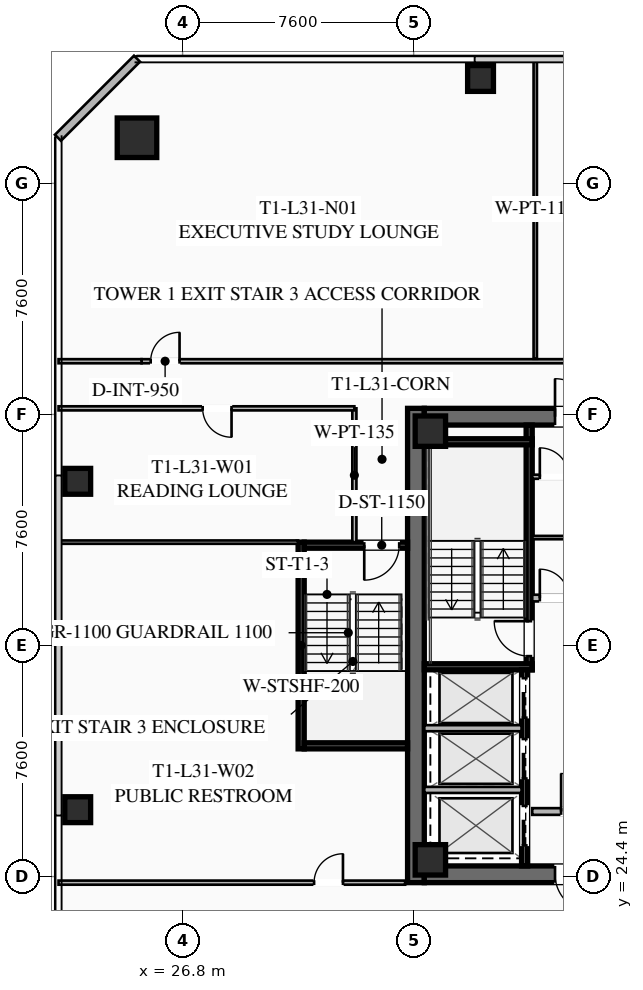
"""IFC4 building model, lengths in metres.
Left out: names, types, materials, properties, quantities, classifications, styles, units other than length and angle.
Written with IfcOpenShell. Run it as: python <this file> out.ifc"""

import sys

from ifc_helpers import new_model, si_unit, direction, frame, frame_2d, origin, origin_2d, place, context, subcontext, project, spatial, rectangle, hollow_rectangle, extrude, element, fill, save


model = new_model("IFC4")
c1 = context("Model", 3, precision=1e-05, world=origin(), true_north=direction((0.0, 1.0)))
c2 = subcontext(c1, "Body", "Model", "MODEL_VIEW")
j1 = project(units=[si_unit("LENGTHUNIT", "METRE"), si_unit("PLANEANGLEUNIT", "RADIAN")], contexts=[c1])
p1 = place(None, origin())
s1 = spatial("IfcSite", under=j1, at=p1, CompositionType="ELEMENT")
p2 = place(p1, origin())
s2 = spatial("IfcBuilding", under=s1, at=p2, CompositionType="ELEMENT")
p3 = place(p2, frame((0.0, 0.0, 117.95)))
s3 = spatial("IfcBuildingStorey", under=s2, at=p3, CompositionType="ELEMENT", Elevation=117.95)
p4 = place(p3, frame((34.475, 24.2, 0.0), z_axis=(0.0, 0.0, 1.0), x_axis=(0.0, 1.0, 0.0)))
e1 = element("IfcWall", 1, at=p4, inside=s3, PredefinedType="SHEAR", context=c2, shape_type="SweptSolid", body=[
    extrude(rectangle(XDim=15.6, YDim=0.55, at=frame_2d((7.8, 0.0))), origin(), (0.0, 0.0, 1.0), 3.55),
])
p5 = place(p3, frame((49.25, 24.475, 0.0), z_axis=(0.0, 0.0, 1.0), x_axis=(-1.0, 0.0, 0.0)))
e2 = element("IfcWall", 2, at=p5, inside=s3, PredefinedType="SHEAR", context=c2, shape_type="SweptSolid", body=[
    extrude(rectangle(XDim=14.5, YDim=0.55, at=frame_2d((7.25, 0.0))), origin(), (0.0, 0.0, 1.0), 3.55),
])
p6 = place(p5, frame((8.95, 0.0, 0.0)))
e3 = element("IfcOpeningElement", 3, at=p6, cuts=e2, PredefinedType="OPENING", context=c2, shape_type="SweptSolid", body=[
    extrude(rectangle(XDim=1.25, YDim=2.25, at=frame_2d((0.625, 1.125))), frame((0.0, 0.285, 0.0), z_axis=(0.0, -1.0, 0.0), x_axis=(1.0, 0.0, 0.0)), (0.0, 0.0, 1.0), 0.57),
])
p7 = place(p5, frame((3.9, 0.0, 0.0)))
e4 = element("IfcOpeningElement", 4, at=p7, cuts=e2, PredefinedType="OPENING", context=c2, shape_type="SweptSolid", body=[
    extrude(rectangle(XDim=1.25, YDim=2.25, at=frame_2d((0.625, 1.125))), frame((0.0, 0.285, 0.0), z_axis=(0.0, -1.0, 0.0), x_axis=(1.0, 0.0, 0.0)), (0.0, 0.0, 1.0), 0.57),
])
p8 = place(p3, frame((34.75, 39.525, 0.0), z_axis=(0.0, 0.0, 1.0), x_axis=(1.0, 0.0, 0.0)))
e5 = element("IfcWall", 5, at=p8, inside=s3, PredefinedType="SHEAR", context=c2, shape_type="SweptSolid", body=[
    extrude(rectangle(XDim=14.5, YDim=0.55, at=frame_2d((7.25, 0.0))), origin(), (0.0, 0.0, 1.0), 3.55),
])
p9 = place(p8, frame((4.3, 0.0, 0.0)))
e6 = element("IfcOpeningElement", 6, at=p9, cuts=e5, PredefinedType="OPENING", context=c2, shape_type="SweptSolid", body=[
    extrude(rectangle(XDim=1.25, YDim=2.25, at=frame_2d((0.625, 1.125))), frame((0.0, 0.285, 0.0), z_axis=(0.0, -1.0, 0.0), x_axis=(1.0, 0.0, 0.0)), (0.0, 0.0, 1.0), 0.57),
])
p10 = place(p8, frame((9.35, 0.0, 0.0)))
e7 = element("IfcOpeningElement", 7, at=p10, cuts=e5, PredefinedType="OPENING", context=c2, shape_type="SweptSolid", body=[
    extrude(rectangle(XDim=1.25, YDim=2.25, at=frame_2d((0.625, 1.125))), frame((0.0, 0.285, 0.0), z_axis=(0.0, -1.0, 0.0), x_axis=(1.0, 0.0, 0.0)), (0.0, 0.0, 1.0), 0.57),
])
for number, where, z_axis, x_axis in (
    (8, (34.95, 24.95, 0.0), (0.0, 0.0, 1.0), (1.0, 0.0, 0.0)),
    (9, (34.95, 39.05, 0.0), (0.0, 0.0, 1.0), (1.0, 0.0, 0.0)),
):
    element("IfcColumn", number, at=place(p3, frame(where, z_axis=z_axis, x_axis=x_axis)), inside=s3, PredefinedType="COLUMN", context=c2, shape_type="SweptSolid", body=[
        extrude(hollow_rectangle(XDim=1.0, YDim=1.0, WallThickness=0.04, at=origin_2d()), origin(), (0.0, 0.0, 1.0), 3.37),
    ])
p11 = place(p3, frame((25.3, 48.7, 0.0), z_axis=(0.0, 0.0, 1.0), x_axis=(1.0, 0.0, 0.0)))
e10 = element("IfcColumn", 10, at=p11, inside=s3, PredefinedType="COLUMN", context=c2, shape_type="SweptSolid", body=[
    extrude(hollow_rectangle(XDim=1.3, YDim=1.3, WallThickness=0.05, at=origin_2d()), origin(), (0.0, 0.0, 1.0), 3.37),
])
for number, where, z_axis, x_axis in (
    (11, (36.6, 50.65, 0.0), (0.0, 0.0, 1.0), (1.0, 0.0, 0.0)),
    (12, (23.35, 37.4, 0.0), (0.0, 0.0, 1.0), (1.0, 0.0, 0.0)),
    (13, (23.35, 26.6, 0.0), (0.0, 0.0, 1.0), (1.0, 0.0, 0.0)),
):
    element("IfcColumn", number, at=place(p3, frame(where, z_axis=z_axis, x_axis=x_axis)), inside=s3, PredefinedType="COLUMN", context=c2, shape_type="SweptSolid", body=[
        extrude(hollow_rectangle(XDim=0.85, YDim=0.85, WallThickness=0.035, at=origin_2d()), origin(), (0.0, 0.0, 1.0), 3.37),
    ])
p12 = place(p3, frame((22.7, 48.7, 0.0), z_axis=(0.0, 0.0, 1.0), x_axis=(0.707106781187, 0.707106781187, 0.0)))
e14 = element("IfcWall", 14, at=p12, inside=s3, PredefinedType="SOLIDWALL", context=c2, shape_type="SweptSolid", body=[
    extrude(rectangle(XDim=3.677, YDim=0.28, at=frame_2d((1.838, 0.0))), origin(), (0.0, 0.0, 1.0), 3.37),
])
p13 = place(p3, frame((38.2, 31.2, 0.0), z_axis=(0.0, 0.0, 1.0), x_axis=(0.0, 1.0, 0.0)))
e15 = element("IfcWall", 15, at=p13, inside=s3, PredefinedType="SHEAR", context=c2, shape_type="SweptSolid", body=[
    extrude(rectangle(XDim=8.05, YDim=0.2, at=frame_2d((4.025, 0.0))), origin(), (0.0, 0.0, 1.0), 3.37),
])
p14 = place(p13, frame((0.45, 0.0, 0.0)))
e16 = element("IfcOpeningElement", 16, at=p14, cuts=e15, PredefinedType="OPENING", context=c2, shape_type="SweptSolid", body=[
    extrude(rectangle(XDim=1.15, YDim=2.2, at=frame_2d((0.575, 1.1))), frame((0.0, 0.11, 0.0), z_axis=(0.0, -1.0, 0.0), x_axis=(1.0, 0.0, 0.0)), (0.0, 0.0, 1.0), 0.22),
])
for number, where, z_axis, x_axis in (
    (17, (34.75, 31.3, 0.0), (0.0, 0.0, 1.0), (1.0, 0.0, 0.0)),
    (18, (34.75, 38.7, 0.0), (0.0, 0.0, 1.0), (1.0, 0.0, 0.0)),
):
    element("IfcWall", number, at=place(p3, frame(where, z_axis=z_axis, x_axis=x_axis)), inside=s3, PredefinedType="SHEAR", context=c2, shape_type="SweptSolid", body=[
        extrude(rectangle(XDim=3.55, YDim=0.2, at=frame_2d((1.775, 0.0))), origin(), (0.0, 0.0, 1.0), 3.37),
    ])
p15 = place(p3, frame((38.3, 33.56, 0.0), z_axis=(0.0, 0.0, 1.0), x_axis=(1.0, 0.0, 0.0)))
e19 = element("IfcWall", 19, at=p15, inside=s3, PredefinedType="SOLIDWALL", context=c2, shape_type="SweptSolid", body=[
    extrude(rectangle(XDim=3.15, YDim=0.22, at=frame_2d((1.575, 0.0))), origin(), (0.0, 0.0, 1.0), 2.723),
])
p16 = place(p15, frame((0.25, 0.0, 0.0)))
e20 = element("IfcOpeningElement", 20, at=p16, cuts=e19, PredefinedType="OPENING", context=c2, shape_type="SweptSolid", body=[
    extrude(rectangle(XDim=0.95, YDim=2.05, at=frame_2d((0.475, 1.025))), frame((0.0, 0.12, 0.0), z_axis=(0.0, -1.0, 0.0), x_axis=(1.0, 0.0, 0.0)), (0.0, 0.0, 1.0), 0.24),
])
p17 = place(p15, frame((1.95, 0.0, 0.0)))
e21 = element("IfcOpeningElement", 21, at=p17, cuts=e19, PredefinedType="OPENING", context=c2, shape_type="SweptSolid", body=[
    extrude(rectangle(XDim=0.95, YDim=2.05, at=frame_2d((0.475, 1.025))), frame((0.0, 0.12, 0.0), z_axis=(0.0, -1.0, 0.0), x_axis=(1.0, 0.0, 0.0)), (0.0, 0.0, 1.0), 0.24),
])
p18 = place(p3, frame((38.3, 26.54, 0.0), z_axis=(0.0, 0.0, 1.0), x_axis=(1.0, 0.0, 0.0)))
e22 = element("IfcWall", 22, at=p18, inside=s3, PredefinedType="SOLIDWALL", context=c2, shape_type="SweptSolid", body=[
    extrude(rectangle(XDim=3.15, YDim=0.22, at=frame_2d((1.575, 0.0))), origin(), (0.0, 0.0, 1.0), 2.723),
])
p19 = place(p18, frame((0.95, 0.0, 0.0)))
e23 = element("IfcOpeningElement", 23, at=p19, cuts=e22, PredefinedType="OPENING", context=c2, shape_type="SweptSolid", body=[
    extrude(rectangle(XDim=1.25, YDim=2.25, at=frame_2d((0.625, 1.125))), frame((0.0, 0.12, 0.0), z_axis=(0.0, -1.0, 0.0), x_axis=(1.0, 0.0, 0.0)), (0.0, 0.0, 1.0), 0.24),
])
p20 = place(p3, frame((38.05, 24.75, 0.0), z_axis=(0.0, 0.0, 1.0), x_axis=(0.0, 1.0, 0.0)))
e24 = element("IfcWall", 24, at=p20, inside=s3, PredefinedType="SHEAR", context=c2, shape_type="SweptSolid", body=[
    extrude(rectangle(XDim=6.45, YDim=0.2, at=frame_2d((3.225, 0.0))), origin(), (0.0, 0.0, 1.0), 3.37),
])
p21 = place(p20, frame((4.875, 0.0, 0.0)))
e25 = element("IfcOpeningElement", 25, at=p21, cuts=e24, PredefinedType="OPENING", context=c2, shape_type="SweptSolid", body=[
    extrude(rectangle(XDim=1.3, YDim=2.25, at=frame_2d((0.65, 1.125))), frame((0.0, 0.11, 0.0), z_axis=(0.0, -1.0, 0.0), x_axis=(1.0, 0.0, 0.0)), (0.0, 0.0, 1.0), 0.22),
])
p22 = place(p20, frame((2.875, 0.0, 0.0)))
e26 = element("IfcOpeningElement", 26, at=p22, cuts=e24, PredefinedType="OPENING", context=c2, shape_type="SweptSolid", body=[
    extrude(rectangle(XDim=1.3, YDim=2.25, at=frame_2d((0.65, 1.125))), frame((0.0, 0.11, 0.0), z_axis=(0.0, -1.0, 0.0), x_axis=(1.0, 0.0, 0.0)), (0.0, 0.0, 1.0), 0.22),
])
p23 = place(p20, frame((0.675, 0.0, 0.0)))
e27 = element("IfcOpeningElement", 27, at=p23, cuts=e24, PredefinedType="OPENING", context=c2, shape_type="SweptSolid", body=[
    extrude(rectangle(XDim=1.3, YDim=2.25, at=frame_2d((0.65, 1.125))), frame((0.0, 0.11, 0.0), z_axis=(0.0, -1.0, 0.0), x_axis=(1.0, 0.0, 0.0)), (0.0, 0.0, 1.0), 0.22),
])
for number, where, z_axis, x_axis in (
    (28, (34.75, 27.25, 0.0), (0.0, 0.0, 1.0), (1.0, 0.0, 0.0)),
    (29, (34.75, 29.28, 0.0), (0.0, 0.0, 1.0), (1.0, 0.0, 0.0)),
):
    element("IfcWall", number, at=place(p3, frame(where, z_axis=z_axis, x_axis=x_axis)), inside=s3, PredefinedType="SOLIDWALL", context=c2, shape_type="SweptSolid", body=[
        extrude(rectangle(XDim=3.2, YDim=0.2, at=frame_2d((1.6, 0.0))), origin(), (0.0, 0.0, 1.0), 3.37),
    ])
p24 = place(p3, frame((38.3, 37.55, 0.0), z_axis=(0.0, 0.0, 1.0), x_axis=(1.0, 0.0, 0.0)))
e30 = element("IfcWall", 30, at=p24, inside=s3, PredefinedType="PARTITIONING", context=c2, shape_type="SweptSolid", body=[
    extrude(rectangle(XDim=3.15, YDim=0.135, at=frame_2d((1.575, 0.0))), origin(), (0.0, 0.0, 1.0), 2.723),
])
p25 = place(p24, frame((0.25, 0.0, 0.0)))
e31 = element("IfcOpeningElement", 31, at=p25, cuts=e30, PredefinedType="OPENING", context=c2, shape_type="SweptSolid", body=[
    extrude(rectangle(XDim=0.95, YDim=2.05, at=frame_2d((0.475, 1.025))), frame((0.0, 0.077, 0.0), z_axis=(0.0, -1.0, 0.0), x_axis=(1.0, 0.0, 0.0)), (0.0, 0.0, 1.0), 0.155),
])
p26 = place(p24, frame((1.95, 0.0, 0.0)))
e32 = element("IfcOpeningElement", 32, at=p26, cuts=e30, PredefinedType="OPENING", context=c2, shape_type="SweptSolid", body=[
    extrude(rectangle(XDim=0.95, YDim=2.05, at=frame_2d((0.475, 1.025))), frame((0.0, 0.077, 0.0), z_axis=(0.0, -1.0, 0.0), x_axis=(1.0, 0.0, 0.0)), (0.0, 0.0, 1.0), 0.155),
])
p27 = place(p3, frame((38.3, 35.55, 0.0), z_axis=(0.0, 0.0, 1.0), x_axis=(1.0, 0.0, 0.0)))
e33 = element("IfcWall", 33, at=p27, inside=s3, PredefinedType="PARTITIONING", context=c2, shape_type="SweptSolid", body=[
    extrude(rectangle(XDim=3.15, YDim=0.11, at=frame_2d((1.575, 0.0))), origin(), (0.0, 0.0, 1.0), 2.723),
])
p28 = place(p3, frame((30.7, 28.6, 0.0), z_axis=(0.0, 0.0, 1.0), x_axis=(0.0, 1.0, 0.0)))
e34 = element("IfcWall", 34, at=p28, inside=s3, PredefinedType="SHEAR", context=c2, shape_type="SweptSolid", body=[
    extrude(rectangle(XDim=6.8, YDim=0.2, at=frame_2d((3.4, 0.0))), origin(), (0.0, 0.0, 1.0), 3.37),
])
p29 = place(p3, frame((34.2, 35.3, 0.0), z_axis=(0.0, 0.0, 1.0), x_axis=(-1.0, 0.0, 0.0)))
e35 = element("IfcWall", 35, at=p29, inside=s3, PredefinedType="SHEAR", context=c2, shape_type="SweptSolid", body=[
    extrude(rectangle(XDim=3.4, YDim=0.2, at=frame_2d((1.7, 0.0))), origin(), (0.0, 0.0, 1.0), 3.37),
])
p30 = place(p29, frame((0.275, 0.0, 0.0)))
e36 = element("IfcOpeningElement", 36, at=p30, cuts=e35, PredefinedType="OPENING", context=c2, shape_type="SweptSolid", body=[
    extrude(rectangle(XDim=1.15, YDim=2.2, at=frame_2d((0.575, 1.1))), frame((0.0, 0.11, 0.0), z_axis=(0.0, -1.0, 0.0), x_axis=(1.0, 0.0, 0.0)), (0.0, 0.0, 1.0), 0.22),
])
p31 = place(p3, frame((30.8, 28.7, 0.0), z_axis=(0.0, 0.0, 1.0), x_axis=(1.0, 0.0, 0.0)))
e37 = element("IfcWall", 37, at=p31, inside=s3, PredefinedType="SHEAR", context=c2, shape_type="SweptSolid", body=[
    extrude(rectangle(XDim=3.4, YDim=0.2, at=frame_2d((1.7, 0.0))), origin(), (0.0, 0.0, 1.0), 3.37),
])
p32 = place(p3, frame((32.45, 35.4, 0.0), z_axis=(0.0, 0.0, 1.0), x_axis=(0.0, 1.0, 0.0)))
e38 = element("IfcWall", 38, at=p32, inside=s3, PredefinedType="PARTITIONING", context=c2, shape_type="SweptSolid", body=[
    extrude(rectangle(XDim=4.4, YDim=0.135, at=frame_2d((2.2, 0.0))), origin(), (0.0, 0.0, 1.0), 2.723),
])
p33 = place(p3, frame((25.45, 41.35, 0.0), z_axis=(0.0, 0.0, 1.0), x_axis=(1.0, 0.0, 0.0)))
e39 = element("IfcWall", 39, at=p33, inside=s3, PredefinedType="PARTITIONING", context=c2, shape_type="SweptSolid", body=[
    extrude(rectangle(XDim=33.1, YDim=0.135, at=frame_2d((16.55, 0.0))), origin(), (0.0, 0.0, 1.0), 2.723),
])
p34 = place(p33, frame((0.3, 0.0, 0.0)))
e40 = element("IfcOpeningElement", 40, at=p34, cuts=e39, PredefinedType="OPENING", context=c2, shape_type="SweptSolid", body=[
    extrude(rectangle(XDim=0.95, YDim=2.05, at=frame_2d((0.475, 1.025))), frame((0.0, 0.077, 0.0), z_axis=(0.0, -1.0, 0.0), x_axis=(1.0, 0.0, 0.0)), (0.0, 0.0, 1.0), 0.155),
])
p35 = place(p33, frame((31.85, 0.0, 0.0)))
e41 = element("IfcOpeningElement", 41, at=p35, cuts=e39, PredefinedType="OPENING", context=c2, shape_type="SweptSolid", body=[
    extrude(rectangle(XDim=0.95, YDim=2.05, at=frame_2d((0.475, 1.025))), frame((0.0, 0.077, 0.0), z_axis=(0.0, -1.0, 0.0), x_axis=(1.0, 0.0, 0.0)), (0.0, 0.0, 1.0), 0.155),
])
p36 = place(p3, frame((22.72, 41.35, 0.0), z_axis=(0.0, 0.0, 1.0), x_axis=(1.0, 0.0, 0.0)))
e42 = element("IfcWall", 42, at=p36, inside=s3, PredefinedType="PARTITIONING", context=c2, shape_type="SweptSolid", body=[
    extrude(rectangle(XDim=2.73, YDim=0.135, at=frame_2d((1.365, 0.0))), origin(), (0.0, 0.0, 1.0), 2.723),
])
p37 = place(p3, frame((38.4, 41.43, 0.0), z_axis=(0.0, 0.0, 1.0), x_axis=(0.0, 1.0, 0.0)))
e43 = element("IfcWall", 43, at=p37, inside=s3, PredefinedType="PARTITIONING", context=c2, shape_type="SweptSolid", body=[
    extrude(rectangle(XDim=9.85, YDim=0.11, at=frame_2d((4.925, 0.0))), origin(), (0.0, 0.0, 1.0), 2.723),
])
p38 = place(p3, frame((32.45, 39.8, 0.0), z_axis=(0.0, 0.0, 1.0), x_axis=(-1.0, 0.0, 0.0)))
e44 = element("IfcWall", 44, at=p38, inside=s3, PredefinedType="PARTITIONING", context=c2, shape_type="SweptSolid", body=[
    extrude(rectangle(XDim=9.73, YDim=0.135, at=frame_2d((4.865, 0.0))), origin(), (0.0, 0.0, 1.0), 2.723),
])
p39 = place(p38, frame((4.04, 0.0, 0.0)))
e45 = element("IfcOpeningElement", 45, at=p39, cuts=e44, PredefinedType="OPENING", context=c2, shape_type="SweptSolid", body=[
    extrude(rectangle(XDim=0.95, YDim=2.05, at=frame_2d((0.475, 1.025))), frame((0.0, 0.077, 0.0), z_axis=(0.0, -1.0, 0.0), x_axis=(1.0, 0.0, 0.0)), (0.0, 0.0, 1.0), 0.155),
])
p40 = place(p3, frame((22.72, 24.2, 0.0), z_axis=(0.0, 0.0, 1.0), x_axis=(1.0, 0.0, 0.0)))
e46 = element("IfcWall", 46, at=p40, inside=s3, PredefinedType="PARTITIONING", context=c2, shape_type="SweptSolid", body=[
    extrude(rectangle(XDim=11.4, YDim=0.135, at=frame_2d((5.7, 0.0))), origin(), (0.0, 0.0, 1.0), 2.723),
])
p41 = place(p40, frame((8.405, 0.0, 0.0)))
e47 = element("IfcOpeningElement", 47, at=p41, cuts=e46, PredefinedType="OPENING", context=c2, shape_type="SweptSolid", body=[
    extrude(rectangle(XDim=0.95, YDim=2.05, at=frame_2d((0.475, 1.025))), frame((0.0, 0.077, 0.0), z_axis=(0.0, -1.0, 0.0), x_axis=(1.0, 0.0, 0.0)), (0.0, 0.0, 1.0), 0.155),
])
p42 = place(p3, frame((30.6, 35.4, 0.0), z_axis=(0.0, 0.0, 1.0), x_axis=(-1.0, 0.0, 0.0)))
e48 = element("IfcWall", 48, at=p42, inside=s3, PredefinedType="PARTITIONING", context=c2, shape_type="SweptSolid", body=[
    extrude(rectangle(XDim=7.88, YDim=0.11, at=frame_2d((3.94, 0.0))), origin(), (0.0, 0.0, 1.0), 2.723),
])
p43 = place(p9, origin())
e49 = element("IfcDoor", 49, at=p43, inside=s3, OperationType="SINGLE_SWING_LEFT", PredefinedType="DOOR", context=c2, shape_type="SweptSolid", body=[
    extrude(rectangle(XDim=1.25, YDim=2.25, at=frame_2d((0.625, 1.125))), frame((0.0, 0.025, 0.0), z_axis=(0.0, -1.0, 0.0), x_axis=(1.0, 0.0, 0.0)), (0.0, 0.0, 1.0), 0.05),
])
fill(e6, e49)
p44 = place(p6, origin())
e50 = element("IfcDoor", 50, at=p44, inside=s3, OperationType="SINGLE_SWING_LEFT", PredefinedType="DOOR", context=c2, shape_type="SweptSolid", body=[
    extrude(rectangle(XDim=1.25, YDim=2.25, at=frame_2d((0.625, 1.125))), frame((0.0, 0.025, 0.0), z_axis=(0.0, -1.0, 0.0), x_axis=(1.0, 0.0, 0.0)), (0.0, 0.0, 1.0), 0.05),
])
fill(e3, e50)
p45 = place(p14, origin())
e51 = element("IfcDoor", 51, at=p45, inside=s3, OperationType="SINGLE_SWING_RIGHT", PredefinedType="DOOR", context=c2, shape_type="SweptSolid", body=[
    extrude(rectangle(XDim=1.15, YDim=2.2, at=frame_2d((0.575, 1.1))), frame((0.0, 0.025, 0.0), z_axis=(0.0, -1.0, 0.0), x_axis=(1.0, 0.0, 0.0)), (0.0, 0.0, 1.0), 0.05),
])
fill(e16, e51)
p46 = place(p19, origin())
e52 = element("IfcDoor", 52, at=p46, inside=s3, OperationType="SINGLE_SWING_LEFT", PredefinedType="DOOR", context=c2, shape_type="SweptSolid", body=[
    extrude(rectangle(XDim=1.25, YDim=2.25, at=frame_2d((0.625, 1.125))), frame((0.0, 0.025, 0.0), z_axis=(0.0, -1.0, 0.0), x_axis=(1.0, 0.0, 0.0)), (0.0, 0.0, 1.0), 0.05),
])
fill(e23, e52)
p47 = place(p25, origin())
e53 = element("IfcDoor", 53, at=p47, inside=s3, OperationType="SINGLE_SWING_LEFT", PredefinedType="DOOR", context=c2, shape_type="SweptSolid", body=[
    extrude(rectangle(XDim=0.95, YDim=2.05, at=frame_2d((0.475, 1.025))), frame((0.0, 0.025, 0.0), z_axis=(0.0, -1.0, 0.0), x_axis=(1.0, 0.0, 0.0)), (0.0, 0.0, 1.0), 0.05),
])
fill(e31, e53)
p48 = place(p16, origin())
e54 = element("IfcDoor", 54, at=p48, inside=s3, OperationType="SINGLE_SWING_LEFT", PredefinedType="DOOR", context=c2, shape_type="SweptSolid", body=[
    extrude(rectangle(XDim=0.95, YDim=2.05, at=frame_2d((0.475, 1.025))), frame((0.0, 0.025, 0.0), z_axis=(0.0, -1.0, 0.0), x_axis=(1.0, 0.0, 0.0)), (0.0, 0.0, 1.0), 0.05),
])
fill(e20, e54)
p49 = place(p30, origin())
e55 = element("IfcDoor", 55, at=p49, inside=s3, OperationType="SINGLE_SWING_RIGHT", PredefinedType="DOOR", context=c2, shape_type="SweptSolid", body=[
    extrude(rectangle(XDim=1.15, YDim=2.2, at=frame_2d((0.575, 1.1))), frame((0.0, 0.025, 0.0), z_axis=(0.0, -1.0, 0.0), x_axis=(1.0, 0.0, 0.0)), (0.0, 0.0, 1.0), 0.05),
])
fill(e36, e55)
p50 = place(p34, origin())
e56 = element("IfcDoor", 56, at=p50, inside=s3, OperationType="SINGLE_SWING_RIGHT", PredefinedType="DOOR", context=c2, shape_type="SweptSolid", body=[
    extrude(rectangle(XDim=0.95, YDim=2.05, at=frame_2d((0.475, 1.025))), frame((0.0, 0.025, 0.0), z_axis=(0.0, -1.0, 0.0), x_axis=(1.0, 0.0, 0.0)), (0.0, 0.0, 1.0), 0.05),
])
fill(e40, e56)
p51 = place(p39, origin())
e57 = element("IfcDoor", 57, at=p51, inside=s3, OperationType="SINGLE_SWING_LEFT", PredefinedType="DOOR", context=c2, shape_type="SweptSolid", body=[
    extrude(rectangle(XDim=0.95, YDim=2.05, at=frame_2d((0.475, 1.025))), frame((0.0, 0.025, 0.0), z_axis=(0.0, -1.0, 0.0), x_axis=(1.0, 0.0, 0.0)), (0.0, 0.0, 1.0), 0.05),
])
fill(e45, e57)
p52 = place(p41, origin())
e58 = element("IfcDoor", 58, at=p52, inside=s3, OperationType="SINGLE_SWING_RIGHT", PredefinedType="DOOR", context=c2, shape_type="SweptSolid", body=[
    extrude(rectangle(XDim=0.95, YDim=2.05, at=frame_2d((0.475, 1.025))), frame((0.0, 0.025, 0.0), z_axis=(0.0, -1.0, 0.0), x_axis=(1.0, 0.0, 0.0)), (0.0, 0.0, 1.0), 0.05),
])
fill(e47, e58)
p53 = place(p21, origin())
e59 = element("IfcDoor", 59, at=p53, inside=s3, OperationType="SLIDING_TO_LEFT", PredefinedType="DOOR", context=c2, shape_type="SweptSolid", body=[
    extrude(rectangle(XDim=1.3, YDim=2.25, at=frame_2d((0.65, 1.125))), frame((0.0, 0.025, 0.0), z_axis=(0.0, -1.0, 0.0), x_axis=(1.0, 0.0, 0.0)), (0.0, 0.0, 1.0), 0.05),
])
fill(e25, e59)
p54 = place(p22, origin())
e60 = element("IfcDoor", 60, at=p54, inside=s3, OperationType="SLIDING_TO_LEFT", PredefinedType="DOOR", context=c2, shape_type="SweptSolid", body=[
    extrude(rectangle(XDim=1.3, YDim=2.25, at=frame_2d((0.65, 1.125))), frame((0.0, 0.025, 0.0), z_axis=(0.0, -1.0, 0.0), x_axis=(1.0, 0.0, 0.0)), (0.0, 0.0, 1.0), 0.05),
])
fill(e26, e60)
p55 = place(p23, origin())
e61 = element("IfcDoor", 61, at=p55, inside=s3, OperationType="SLIDING_TO_LEFT", PredefinedType="DOOR", context=c2, shape_type="SweptSolid", body=[
    extrude(rectangle(XDim=1.3, YDim=2.25, at=frame_2d((0.65, 1.125))), frame((0.0, 0.025, 0.0), z_axis=(0.0, -1.0, 0.0), x_axis=(1.0, 0.0, 0.0)), (0.0, 0.0, 1.0), 0.05),
])
fill(e27, e61)
save(model, sys.argv[1])
